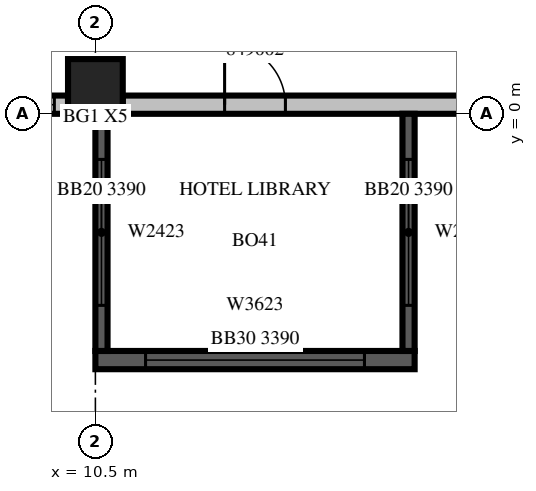
"""IFC4 building model, lengths in metres.
Left out: names, types, materials, properties, quantities, classifications, styles, units other than length and angle.
Written with IfcOpenShell. Run it as: python <this file> out.ifc"""

import sys

from ifc_helpers import new_model, si_unit, direction, frame, frame_2d, origin, origin_2d, place, context, subcontext, project, spatial, rectangle, extrude, source, transform, mapped, element, fill, save


model = new_model("IFC4")
c1 = context("Model", 3, precision=1e-05, world=origin(), true_north=direction((0.0, 1.0)))
c2 = subcontext(c1, "Body", "Model", "MODEL_VIEW")
j1 = project(units=[si_unit("LENGTHUNIT", "METRE"), si_unit("PLANEANGLEUNIT", "RADIAN")], contexts=[c1])
p1 = place(None, origin())
s1 = spatial("IfcSite", under=j1, at=p1, CompositionType="ELEMENT")
p2 = place(p1, origin())
s2 = spatial("IfcBuilding", under=s1, at=p2, CompositionType="ELEMENT")
p3 = place(p2, frame((0.0, 0.0, 219.6)))
s3 = spatial("IfcBuildingStorey", under=s2, at=p3, CompositionType="ELEMENT", Elevation=219.6)
m1 = source(origin(), c2, "Body", "SweptSolid", [
    extrude(rectangle(XDim=0.9, YDim=0.9, at=origin_2d()), origin(), (0.0, 0.0, 1.0), 3.8),
])
p4 = place(p3, frame((10.5, 0.45, 0.0), z_axis=(0.0, 0.0, 1.0), x_axis=(1.0, 0.0, 0.0)))
e1 = element("IfcColumn", 1, at=p4, inside=s3, PredefinedType="COLUMN", context=c2, shape_type="MappedRepresentation", body=[
    mapped(m1, transform((0.0, 0.0, 0.0), scale=1.0)),
])
m2 = source(origin(), c2, "Body", "SweptSolid", [
    extrude(rectangle(XDim=5.85, YDim=0.3, at=frame_2d((2.925, 0.0))), origin(), (0.0, 0.0, 1.0), 3.4),
])
p5 = place(p3, frame((4.2, 0.15, 0.0), z_axis=(0.0, 0.0, 1.0), x_axis=(1.0, 0.0, 0.0)))
e2 = element("IfcWall", 2, at=p5, inside=s3, PredefinedType="STANDARD", context=c2, shape_type="MappedRepresentation", body=[
    mapped(m2, transform((0.0, 0.0, 0.0), scale=1.0)),
])
m3 = source(origin(), c2, "Body", "SweptSolid", [
    extrude(rectangle(XDim=1.8, YDim=2.3, at=frame_2d((0.9, 1.15))), frame((0.0, 0.16, 0.0), z_axis=(0.0, -1.0, 0.0), x_axis=(1.0, 0.0, 0.0)), (0.0, 0.0, 1.0), 0.32),
])
p6 = place(p5, frame((0.675, 0.0, 0.6)))
e3 = element("IfcOpeningElement", 3, at=p6, cuts=e2, PredefinedType="OPENING", context=c2, shape_type="MappedRepresentation", body=[
    mapped(m3, transform((0.0, 0.0, 0.0), scale=1.0)),
])
p7 = place(p5, frame((3.825, 0.0, 0.6)))
e4 = element("IfcOpeningElement", 4, at=p7, cuts=e2, PredefinedType="OPENING", context=c2, shape_type="MappedRepresentation", body=[
    mapped(m3, transform((0.0, 0.0, 0.0), scale=1.0)),
])
m4 = source(origin(), c2, "Body", "SweptSolid", [
    extrude(rectangle(XDim=9.6, YDim=0.3, at=frame_2d((4.8, 0.0))), origin(), (0.0, 0.0, 1.0), 3.4),
])
p8 = place(p3, frame((10.95, 0.15, 0.0), z_axis=(0.0, 0.0, 1.0), x_axis=(1.0, 0.0, 0.0)))
e5 = element("IfcWall", 5, at=p8, inside=s3, PredefinedType="STANDARD", context=c2, shape_type="MappedRepresentation", body=[
    mapped(m4, transform((0.0, 0.0, 0.0), scale=1.0)),
])
m5 = source(origin(), c2, "Body", "SweptSolid", [
    extrude(rectangle(XDim=3.6, YDim=2.3, at=frame_2d((1.8, 1.15))), frame((0.0, 0.16, 0.0), z_axis=(0.0, -1.0, 0.0), x_axis=(1.0, 0.0, 0.0)), (0.0, 0.0, 1.0), 0.32),
])
p9 = place(p8, frame((5.625, 0.0, 0.6)))
e6 = element("IfcOpeningElement", 6, at=p9, cuts=e5, PredefinedType="OPENING", context=c2, shape_type="MappedRepresentation", body=[
    mapped(m5, transform((0.0, 0.0, 0.0), scale=1.0)),
])
m6 = source(origin(), c2, "Body", "SweptSolid", [
    extrude(rectangle(XDim=1.0, YDim=2.1, at=frame_2d((0.5, 1.05))), frame((0.0, 0.16, 0.0), z_axis=(0.0, -1.0, 0.0), x_axis=(1.0, 0.0, 0.0)), (0.0, 0.0, 1.0), 0.32),
])
p10 = place(p8, frame((1.675, 0.0, 0.0)))
e7 = element("IfcOpeningElement", 7, at=p10, cuts=e5, PredefinedType="OPENING", context=c2, shape_type="MappedRepresentation", body=[
    mapped(m6, transform((0.0, 0.0, 0.0), scale=1.0)),
])
m7 = source(origin(), c2, "Body", "SweptSolid", [
    extrude(rectangle(XDim=5.25, YDim=0.3, at=frame_2d((2.625, 0.0))), origin(), (0.0, 0.0, 1.0), 3.39),
])
p11 = place(p3, frame((10.5, -4.05, 0.0), z_axis=(0.0, 0.0, 1.0), x_axis=(1.0, 0.0, 0.0)))
e8 = element("IfcWall", 8, at=p11, inside=s3, PredefinedType="SOLIDWALL", context=c2, shape_type="MappedRepresentation", body=[
    mapped(m7, transform((0.0, 0.0, 0.0), scale=1.0)),
])
p12 = place(p11, frame((0.825, 0.0, 0.6)))
e9 = element("IfcOpeningElement", 9, at=p12, cuts=e8, PredefinedType="OPENING", context=c2, shape_type="MappedRepresentation", body=[
    mapped(m5, transform((0.0, 0.0, 0.0), scale=1.0)),
])
m8 = source(origin(), c2, "Body", "SweptSolid", [
    extrude(rectangle(XDim=3.9, YDim=0.2, at=frame_2d((1.95, 0.0))), origin(), (0.0, 0.0, 1.0), 3.39),
])
p13 = place(p3, frame((10.6, 0.0, 0.0), z_axis=(0.0, 0.0, 1.0), x_axis=(0.0, -1.0, 0.0)))
e10 = element("IfcWall", 10, at=p13, inside=s3, PredefinedType="SOLIDWALL", context=c2, shape_type="MappedRepresentation", body=[
    mapped(m8, transform((0.0, 0.0, 0.0), scale=1.0)),
])
m9 = source(origin(), c2, "Body", "SweptSolid", [
    extrude(rectangle(XDim=2.4, YDim=2.3, at=frame_2d((1.2, 1.15))), frame((0.0, 0.11, 0.0), z_axis=(0.0, -1.0, 0.0), x_axis=(1.0, 0.0, 0.0)), (0.0, 0.0, 1.0), 0.22),
])
p14 = place(p13, frame((0.75, 0.0, 0.6)))
e11 = element("IfcOpeningElement", 11, at=p14, cuts=e10, PredefinedType="OPENING", context=c2, shape_type="MappedRepresentation", body=[
    mapped(m9, transform((0.0, 0.0, 0.0), scale=1.0)),
])
p15 = place(p3, frame((15.65, 0.0, 0.0), z_axis=(0.0, 0.0, 1.0), x_axis=(0.0, -1.0, 0.0)))
e12 = element("IfcWall", 12, at=p15, inside=s3, PredefinedType="SOLIDWALL", context=c2, shape_type="MappedRepresentation", body=[
    mapped(m8, transform((0.0, 0.0, 0.0), scale=1.0)),
])
p16 = place(p15, frame((0.75, 0.0, 0.6)))
e13 = element("IfcOpeningElement", 13, at=p16, cuts=e12, PredefinedType="OPENING", context=c2, shape_type="MappedRepresentation", body=[
    mapped(m9, transform((0.0, 0.0, 0.0), scale=1.0)),
])
m10 = source(origin(), c2, "Body", "SweptSolid", [
    extrude(rectangle(XDim=1.8, YDim=2.3, at=frame_2d((0.9, 1.15))), frame((0.0, 0.03, 0.0), z_axis=(0.0, -1.0, 0.0), x_axis=(1.0, 0.0, 0.0)), (0.0, 0.0, 1.0), 0.06),
])
p17 = place(p7, origin())
e14 = element("IfcWindow", 14, at=p17, inside=s3, PartitioningType="SINGLE_PANEL", PredefinedType="WINDOW", context=c2, shape_type="MappedRepresentation", body=[
    mapped(m10, transform((0.0, 0.0, 0.0), scale=1.0)),
])
fill(e4, e14)
m11 = source(origin(), c2, "Body", "SweptSolid", [
    extrude(rectangle(XDim=3.6, YDim=2.3, at=frame_2d((1.8, 1.15))), frame((0.0, 0.03, 0.0), z_axis=(0.0, -1.0, 0.0), x_axis=(1.0, 0.0, 0.0)), (0.0, 0.0, 1.0), 0.06),
])
p18 = place(p12, origin())
e15 = element("IfcWindow", 15, at=p18, inside=s3, PartitioningType="SINGLE_PANEL", PredefinedType="WINDOW", context=c2, shape_type="MappedRepresentation", body=[
    mapped(m11, transform((0.0, 0.0, 0.0), scale=1.0)),
])
fill(e9, e15)
m12 = source(origin(), c2, "Body", "SweptSolid", [
    extrude(rectangle(XDim=2.4, YDim=2.3, at=frame_2d((1.2, 1.15))), frame((0.0, 0.03, 0.0), z_axis=(0.0, -1.0, 0.0), x_axis=(1.0, 0.0, 0.0)), (0.0, 0.0, 1.0), 0.06),
])
p19 = place(p14, origin())
e16 = element("IfcWindow", 16, at=p19, inside=s3, PartitioningType="SINGLE_PANEL", PredefinedType="WINDOW", context=c2, shape_type="MappedRepresentation", body=[
    mapped(m12, transform((0.0, 0.0, 0.0), scale=1.0)),
])
fill(e11, e16)
p20 = place(p16, origin())
e17 = element("IfcWindow", 17, at=p20, inside=s3, PartitioningType="SINGLE_PANEL", PredefinedType="WINDOW", context=c2, shape_type="MappedRepresentation", body=[
    mapped(m12, transform((0.0, 0.0, 0.0), scale=1.0)),
])
fill(e13, e17)
m13 = source(origin(), c2, "Body", "SweptSolid", [
    extrude(rectangle(XDim=1.0, YDim=2.1, at=frame_2d((0.5, 1.05))), frame((0.0, 0.025, 0.0), z_axis=(0.0, -1.0, 0.0), x_axis=(1.0, 0.0, 0.0)), (0.0, 0.0, 1.0), 0.05),
])
p21 = place(p10, origin())
e18 = element("IfcDoor", 18, at=p21, inside=s3, OperationType="SINGLE_SWING_LEFT", PredefinedType="DOOR", context=c2, shape_type="MappedRepresentation", body=[
    mapped(m13, transform((0.0, 0.0, 0.0), scale=1.0)),
])
fill(e7, e18)
save(model, sys.argv[1])
